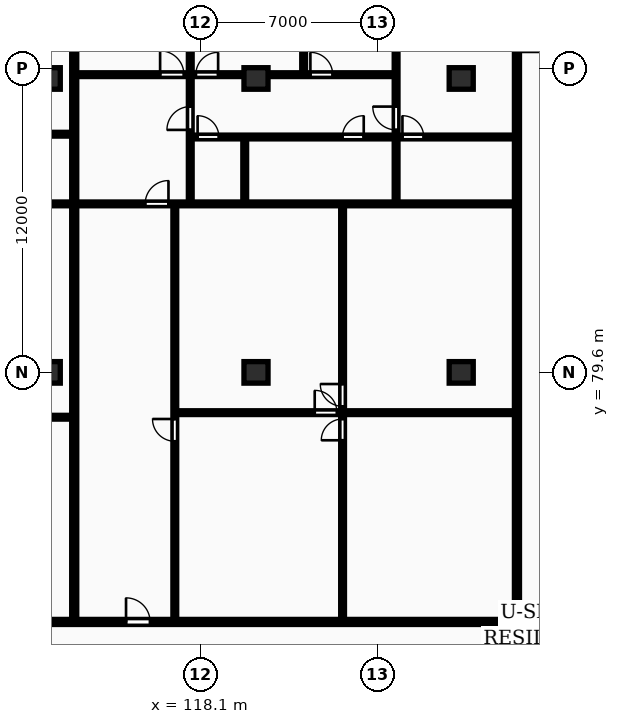
"""IFC4 building model, lengths in metres.
Left out: names, types, materials, properties, quantities, classifications, styles, units other than length and angle.
Written with IfcOpenShell. Run it as: python <this file> out.ifc"""

import sys

from ifc_helpers import new_model, si_unit, direction, frame, frame_2d, origin, origin_2d, place, context, subcontext, project, spatial, rectangle, extrude, element, fill, save


model = new_model("IFC4")
c1 = context("Model", 3, precision=1e-05, world=origin(), true_north=direction((0.0, 1.0)))
c2 = subcontext(c1, "Body", "Model", "MODEL_VIEW")
j1 = project(units=[si_unit("LENGTHUNIT", "METRE"), si_unit("PLANEANGLEUNIT", "RADIAN")], contexts=[c1])
p1 = place(None, origin())
s1 = spatial("IfcSite", under=j1, at=p1, CompositionType="ELEMENT")
p2 = place(p1, origin())
s2 = spatial("IfcBuilding", under=s1, at=p2, CompositionType="ELEMENT")
p3 = place(p2, frame((0.0, 0.0, 132.8)))
s3 = spatial("IfcBuildingStorey", under=s2, at=p3, CompositionType="ELEMENT", Elevation=132.8)
for number, where, z_axis, x_axis in (
    (1, (112.1, 79.6, 0.0), (0.0, 0.0, 1.0), (1.0, 0.0, 0.0)),
    (2, (112.1, 91.2, 0.0), (0.0, 0.0, 1.0), (1.0, 0.0, 0.0)),
    (3, (120.3, 79.6, 0.0), (0.0, 0.0, 1.0), (1.0, 0.0, 0.0)),
    (4, (120.3, 91.2, 0.0), (0.0, 0.0, 1.0), (1.0, 0.0, 0.0)),
    (5, (128.4, 79.6, 0.0), (0.0, 0.0, 1.0), (1.0, 0.0, 0.0)),
    (6, (128.4, 91.2, 0.0), (0.0, 0.0, 1.0), (1.0, 0.0, 0.0)),
):
    element("IfcColumn", number, at=place(p3, frame(where, z_axis=z_axis, x_axis=x_axis)), inside=s3, PredefinedType="COLUMN", context=c2, shape_type="SweptSolid", body=[
        extrude(rectangle(XDim=0.95, YDim=0.85, at=origin_2d()), origin(), (0.0, 0.0, 1.0), 3.25),
    ])
for number, where, z_axis, x_axis in (
    (7, (130.6, 69.83, 0.0), (0.0, 0.0, 1.0), (0.0, 1.0, 0.0)),
    (8, (113.125, 69.83, 0.0), (0.0, 0.0, 1.0), (0.0, 1.0, 0.0)),
):
    element("IfcWall", number, at=place(p3, frame(where, z_axis=z_axis, x_axis=x_axis)), inside=s3, PredefinedType="PARTITIONING", context=c2, shape_type="SweptSolid", body=[
        extrude(rectangle(XDim=26.07, YDim=0.2, at=frame_2d((13.035, 0.0))), origin(), (0.0, 0.0, 1.0), 2.97),
    ])
p4 = place(p3, frame((96.867, 77.83, 0.0), z_axis=(0.0, 0.0, 1.0), x_axis=(1.0, 0.0, 0.0)))
e9 = element("IfcWall", 9, at=p4, inside=s3, PredefinedType="PARTITIONING", context=c2, shape_type="SweptSolid", body=[
    extrude(rectangle(XDim=16.177, YDim=0.15, at=frame_2d((8.089, 0.0))), origin(), (0.0, 0.0, 1.0), 2.97),
])
p5 = place(p4, frame((3.45, 0.0, 0.0)))
e10 = element("IfcOpeningElement", 10, at=p5, cuts=e9, PredefinedType="OPENING", context=c2, shape_type="SweptSolid", body=[
    extrude(rectangle(XDim=0.88, YDim=2.06, at=frame_2d((0.44, 1.03))), frame((0.0, 0.085, 0.0), z_axis=(0.0, -1.0, 0.0), x_axis=(1.0, 0.0, 0.0)), (0.0, 0.0, 1.0), 0.17),
])
p6 = place(p3, frame((97.248, 89.0, 0.0), z_axis=(0.0, 0.0, 1.0), x_axis=(1.0, 0.0, 0.0)))
e11 = element("IfcWall", 11, at=p6, inside=s3, PredefinedType="PARTITIONING", context=c2, shape_type="SweptSolid", body=[
    extrude(rectangle(XDim=15.797, YDim=0.15, at=frame_2d((7.899, 0.0))), origin(), (0.0, 0.0, 1.0), 2.97),
])
p7 = place(p6, frame((1.191, 0.0, 0.0)))
e12 = element("IfcOpeningElement", 12, at=p7, cuts=e11, PredefinedType="OPENING", context=c2, shape_type="SweptSolid", body=[
    extrude(rectangle(XDim=0.84, YDim=2.04, at=frame_2d((0.42, 1.02))), frame((0.0, 0.085, 0.0), z_axis=(0.0, -1.0, 0.0), x_axis=(1.0, 0.0, 0.0)), (0.0, 0.0, 1.0), 0.17),
])
p8 = place(p6, frame((7.479, 0.0, 0.0)))
e13 = element("IfcOpeningElement", 13, at=p8, cuts=e11, PredefinedType="OPENING", context=c2, shape_type="SweptSolid", body=[
    extrude(rectangle(XDim=0.84, YDim=2.04, at=frame_2d((0.42, 1.02))), frame((0.0, 0.085, 0.0), z_axis=(0.0, -1.0, 0.0), x_axis=(1.0, 0.0, 0.0)), (0.0, 0.0, 1.0), 0.17),
])
p9 = place(p6, frame((11.798, 0.0, 0.0)))
e14 = element("IfcOpeningElement", 14, at=p9, cuts=e11, PredefinedType="OPENING", context=c2, shape_type="SweptSolid", body=[
    extrude(rectangle(XDim=0.84, YDim=2.04, at=frame_2d((0.42, 1.02))), frame((0.0, 0.085, 0.0), z_axis=(0.0, -1.0, 0.0), x_axis=(1.0, 0.0, 0.0)), (0.0, 0.0, 1.0), 0.17),
])
p10 = place(p3, frame((92.917, 86.25, 0.0), z_axis=(0.0, 0.0, 1.0), x_axis=(1.0, 0.0, 0.0)))
e15 = element("IfcWall", 15, at=p10, inside=s3, PredefinedType="PARTITIONING", context=c2, shape_type="SweptSolid", body=[
    extrude(rectangle(XDim=20.127, YDim=0.15, at=frame_2d((10.064, 0.0))), origin(), (0.0, 0.0, 1.0), 2.97),
])
p11 = place(p10, frame((2.72, 0.0, 0.0)))
e16 = element("IfcOpeningElement", 16, at=p11, cuts=e15, PredefinedType="OPENING", context=c2, shape_type="SweptSolid", body=[
    extrude(rectangle(XDim=0.92, YDim=2.08, at=frame_2d((0.46, 1.04))), frame((0.0, 0.085, 0.0), z_axis=(0.0, -1.0, 0.0), x_axis=(1.0, 0.0, 0.0)), (0.0, 0.0, 1.0), 0.17),
])
p12 = place(p3, frame((123.718, 69.81, 0.0), z_axis=(0.0, 0.0, 1.0), x_axis=(0.0, 1.0, 0.0)))
e17 = element("IfcWall", 17, at=p12, inside=s3, PredefinedType="PARTITIONING", context=c2, shape_type="SweptSolid", body=[
    extrude(rectangle(XDim=16.4, YDim=0.15, at=frame_2d((8.2, 0.0))), origin(), (0.0, 0.0, 1.0), 2.97),
])
p13 = place(p12, frame((7.11, 0.0, 0.0)))
e18 = element("IfcOpeningElement", 18, at=p13, cuts=e17, PredefinedType="OPENING", context=c2, shape_type="SweptSolid", body=[
    extrude(rectangle(XDim=0.84, YDim=2.04, at=frame_2d((0.42, 1.02))), frame((0.0, 0.085, 0.0), z_axis=(0.0, -1.0, 0.0), x_axis=(1.0, 0.0, 0.0)), (0.0, 0.0, 1.0), 0.17),
])
p14 = place(p12, frame((8.45, 0.0, 0.0)))
e19 = element("IfcOpeningElement", 19, at=p14, cuts=e17, PredefinedType="OPENING", context=c2, shape_type="SweptSolid", body=[
    extrude(rectangle(XDim=0.88, YDim=2.06, at=frame_2d((0.44, 1.03))), frame((0.0, 0.085, 0.0), z_axis=(0.0, -1.0, 0.0), x_axis=(1.0, 0.0, 0.0)), (0.0, 0.0, 1.0), 0.17),
])
p15 = place(p3, frame((117.155, 78.01, 0.0), z_axis=(0.0, 0.0, 1.0), x_axis=(1.0, 0.0, 0.0)))
e20 = element("IfcWall", 20, at=p15, inside=s3, PredefinedType="PARTITIONING", context=c2, shape_type="SweptSolid", body=[
    extrude(rectangle(XDim=13.365, YDim=0.15, at=frame_2d((6.683, 0.0))), origin(), (0.0, 0.0, 1.0), 2.97),
])
p16 = place(p15, frame((5.462, 0.0, 0.0)))
e21 = element("IfcOpeningElement", 21, at=p16, cuts=e20, PredefinedType="OPENING", context=c2, shape_type="SweptSolid", body=[
    extrude(rectangle(XDim=0.88, YDim=2.06, at=frame_2d((0.44, 1.03))), frame((0.0, 0.085, 0.0), z_axis=(0.0, -1.0, 0.0), x_axis=(1.0, 0.0, 0.0)), (0.0, 0.0, 1.0), 0.17),
])
p17 = place(p3, frame((117.095, 69.81, 0.0), z_axis=(0.0, 0.0, 1.0), x_axis=(0.0, 1.0, 0.0)))
e22 = element("IfcWall", 22, at=p17, inside=s3, PredefinedType="PARTITIONING", context=c2, shape_type="SweptSolid", body=[
    extrude(rectangle(XDim=16.4, YDim=0.15, at=frame_2d((8.2, 0.0))), origin(), (0.0, 0.0, 1.0), 2.97),
])
p18 = place(p17, frame((7.07, 0.0, 0.0)))
e23 = element("IfcOpeningElement", 23, at=p18, cuts=e22, PredefinedType="OPENING", context=c2, shape_type="SweptSolid", body=[
    extrude(rectangle(XDim=0.88, YDim=2.06, at=frame_2d((0.44, 1.03))), frame((0.0, 0.085, 0.0), z_axis=(0.0, -1.0, 0.0), x_axis=(1.0, 0.0, 0.0)), (0.0, 0.0, 1.0), 0.17),
])
p19 = place(p3, frame((119.855, 86.29, 0.0), z_axis=(0.0, 0.0, 1.0), x_axis=(0.0, 1.0, 0.0)))
e24 = element("IfcWall", 24, at=p19, inside=s3, PredefinedType="PARTITIONING", context=c2, shape_type="SweptSolid", body=[
    extrude(rectangle(XDim=2.58, YDim=0.15, at=frame_2d((1.29, 0.0))), origin(), (0.0, 0.0, 1.0), 2.97),
])
p20 = place(p3, frame((122.18, 91.43, 0.0), z_axis=(0.0, 0.0, 1.0), x_axis=(0.0, 1.0, 0.0)))
e25 = element("IfcWall", 25, at=p20, inside=s3, PredefinedType="PARTITIONING", context=c2, shape_type="SweptSolid", body=[
    extrude(rectangle(XDim=4.47, YDim=0.15, at=frame_2d((2.235, 0.0))), origin(), (0.0, 0.0, 1.0), 2.97),
])
p21 = place(p3, frame((117.705, 86.29, 0.0), z_axis=(0.0, 0.0, 1.0), x_axis=(0.0, 1.0, 0.0)))
e26 = element("IfcWall", 26, at=p21, inside=s3, PredefinedType="PARTITIONING", context=c2, shape_type="SweptSolid", body=[
    extrude(rectangle(XDim=9.61, YDim=0.15, at=frame_2d((4.805, 0.0))), origin(), (0.0, 0.0, 1.0), 2.97),
])
p22 = place(p21, frame((2.88, 0.0, 0.0)))
e27 = element("IfcOpeningElement", 27, at=p22, cuts=e26, PredefinedType="OPENING", context=c2, shape_type="SweptSolid", body=[
    extrude(rectangle(XDim=0.92, YDim=2.08, at=frame_2d((0.46, 1.04))), frame((0.0, 0.085, 0.0), z_axis=(0.0, -1.0, 0.0), x_axis=(1.0, 0.0, 0.0)), (0.0, 0.0, 1.0), 0.17),
])
p23 = place(p3, frame((125.83, 86.29, 0.0), z_axis=(0.0, 0.0, 1.0), x_axis=(0.0, 1.0, 0.0)))
e28 = element("IfcWall", 28, at=p23, inside=s3, PredefinedType="PARTITIONING", context=c2, shape_type="SweptSolid", body=[
    extrude(rectangle(XDim=2.58, YDim=0.15, at=frame_2d((1.29, 0.0))), origin(), (0.0, 0.0, 1.0), 2.97),
])
p24 = place(p3, frame((125.83, 88.91, 0.0), z_axis=(0.0, 0.0, 1.0), x_axis=(0.0, 1.0, 0.0)))
e29 = element("IfcWall", 29, at=p24, inside=s3, PredefinedType="PARTITIONING", context=c2, shape_type="SweptSolid", body=[
    extrude(rectangle(XDim=6.99, YDim=0.15, at=frame_2d((3.495, 0.0))), origin(), (0.0, 0.0, 1.0), 2.97),
])
p25 = place(p24, frame((0.26, 0.0, 0.0)))
e30 = element("IfcOpeningElement", 30, at=p25, cuts=e29, PredefinedType="OPENING", context=c2, shape_type="SweptSolid", body=[
    extrude(rectangle(XDim=0.92, YDim=2.08, at=frame_2d((0.46, 1.04))), frame((0.0, 0.085, 0.0), z_axis=(0.0, -1.0, 0.0), x_axis=(1.0, 0.0, 0.0)), (0.0, 0.0, 1.0), 0.17),
])
p26 = place(p3, frame((117.745, 88.89, 0.0), z_axis=(0.0, 0.0, 1.0), x_axis=(1.0, 0.0, 0.0)))
e31 = element("IfcWall", 31, at=p26, inside=s3, PredefinedType="PARTITIONING", context=c2, shape_type="SweptSolid", body=[
    extrude(rectangle(XDim=12.775, YDim=0.15, at=frame_2d((6.387, 0.0))), origin(), (0.0, 0.0, 1.0), 2.97),
])
p27 = place(p26, frame((0.25, 0.0, 0.0)))
e32 = element("IfcOpeningElement", 32, at=p27, cuts=e31, PredefinedType="OPENING", context=c2, shape_type="SweptSolid", body=[
    extrude(rectangle(XDim=0.84, YDim=2.04, at=frame_2d((0.42, 1.02))), frame((0.0, 0.085, 0.0), z_axis=(0.0, -1.0, 0.0), x_axis=(1.0, 0.0, 0.0)), (0.0, 0.0, 1.0), 0.17),
])
p28 = place(p26, frame((5.968, 0.0, 0.0)))
e33 = element("IfcOpeningElement", 33, at=p28, cuts=e31, PredefinedType="OPENING", context=c2, shape_type="SweptSolid", body=[
    extrude(rectangle(XDim=0.84, YDim=2.04, at=frame_2d((0.42, 1.02))), frame((0.0, 0.085, 0.0), z_axis=(0.0, -1.0, 0.0), x_axis=(1.0, 0.0, 0.0)), (0.0, 0.0, 1.0), 0.17),
])
p29 = place(p26, frame((8.335, 0.0, 0.0)))
e34 = element("IfcOpeningElement", 34, at=p29, cuts=e31, PredefinedType="OPENING", context=c2, shape_type="SweptSolid", body=[
    extrude(rectangle(XDim=0.84, YDim=2.04, at=frame_2d((0.42, 1.02))), frame((0.0, 0.085, 0.0), z_axis=(0.0, -1.0, 0.0), x_axis=(1.0, 0.0, 0.0)), (0.0, 0.0, 1.0), 0.17),
])
p30 = place(p3, frame((113.205, 86.25, 0.0), z_axis=(0.0, 0.0, 1.0), x_axis=(1.0, 0.0, 0.0)))
e35 = element("IfcWall", 35, at=p30, inside=s3, PredefinedType="PARTITIONING", context=c2, shape_type="SweptSolid", body=[
    extrude(rectangle(XDim=17.315, YDim=0.15, at=frame_2d((8.657, 0.0))), origin(), (0.0, 0.0, 1.0), 2.97),
])
p31 = place(p30, frame((2.72, 0.0, 0.0)))
e36 = element("IfcOpeningElement", 36, at=p31, cuts=e35, PredefinedType="OPENING", context=c2, shape_type="SweptSolid", body=[
    extrude(rectangle(XDim=0.92, YDim=2.08, at=frame_2d((0.46, 1.04))), frame((0.0, 0.085, 0.0), z_axis=(0.0, -1.0, 0.0), x_axis=(1.0, 0.0, 0.0)), (0.0, 0.0, 1.0), 0.17),
])
p32 = place(p3, frame((113.205, 91.35, 0.0), z_axis=(0.0, 0.0, 1.0), x_axis=(1.0, 0.0, 0.0)))
e37 = element("IfcWall", 37, at=p32, inside=s3, PredefinedType="PARTITIONING", context=c2, shape_type="SweptSolid", body=[
    extrude(rectangle(XDim=12.625, YDim=0.15, at=frame_2d((6.312, 0.0))), origin(), (0.0, 0.0, 1.0), 2.663),
])
p33 = place(p32, frame((3.31, 0.0, 0.0)))
e38 = element("IfcOpeningElement", 38, at=p33, cuts=e37, PredefinedType="OPENING", context=c2, shape_type="SweptSolid", body=[
    extrude(rectangle(XDim=0.94, YDim=2.1, at=frame_2d((0.47, 1.05))), frame((0.0, 0.085, 0.0), z_axis=(0.0, -1.0, 0.0), x_axis=(1.0, 0.0, 0.0)), (0.0, 0.0, 1.0), 0.17),
])
p34 = place(p32, frame((4.72, 0.0, 0.0)))
e39 = element("IfcOpeningElement", 39, at=p34, cuts=e37, PredefinedType="OPENING", context=c2, shape_type="SweptSolid", body=[
    extrude(rectangle(XDim=0.88, YDim=2.06, at=frame_2d((0.44, 1.03))), frame((0.0, 0.085, 0.0), z_axis=(0.0, -1.0, 0.0), x_axis=(1.0, 0.0, 0.0)), (0.0, 0.0, 1.0), 0.17),
])
p35 = place(p32, frame((9.242, 0.0, 0.0)))
e40 = element("IfcOpeningElement", 40, at=p35, cuts=e37, PredefinedType="OPENING", context=c2, shape_type="SweptSolid", body=[
    extrude(rectangle(XDim=0.88, YDim=2.06, at=frame_2d((0.44, 1.03))), frame((0.0, 0.085, 0.0), z_axis=(0.0, -1.0, 0.0), x_axis=(1.0, 0.0, 0.0)), (0.0, 0.0, 1.0), 0.17),
])
p36 = place(p3, frame((57.6, 69.75, 0.0), z_axis=(0.0, 0.0, 1.0), x_axis=(1.0, 0.0, 0.0)))
e41 = element("IfcWall", 41, at=p36, inside=s3, PredefinedType="PARTITIONING", context=c2, shape_type="SweptSolid", body=[
    extrude(rectangle(XDim=73.0, YDim=0.2, at=frame_2d((36.5, 0.0))), origin(), (0.0, 0.0, 1.0), 2.97),
])
p37 = place(p36, frame((6.629, 0.0, 0.0)))
e42 = element("IfcOpeningElement", 42, at=p37, cuts=e41, PredefinedType="OPENING", context=c2, shape_type="SweptSolid", body=[
    extrude(rectangle(XDim=1.22, YDim=2.18, at=frame_2d((0.61, 1.09))), frame((0.0, 0.11, 0.0), z_axis=(0.0, -1.0, 0.0), x_axis=(1.0, 0.0, 0.0)), (0.0, 0.0, 1.0), 0.22),
])
p38 = place(p36, frame((24.022, 0.0, 0.0)))
e43 = element("IfcOpeningElement", 43, at=p38, cuts=e41, PredefinedType="OPENING", context=c2, shape_type="SweptSolid", body=[
    extrude(rectangle(XDim=1.22, YDim=2.18, at=frame_2d((0.61, 1.09))), frame((0.0, 0.11, 0.0), z_axis=(0.0, -1.0, 0.0), x_axis=(1.0, 0.0, 0.0)), (0.0, 0.0, 1.0), 0.22),
])
p39 = place(p36, frame((37.768, 0.0, 0.0)))
e44 = element("IfcOpeningElement", 44, at=p39, cuts=e41, PredefinedType="OPENING", context=c2, shape_type="SweptSolid", body=[
    extrude(rectangle(XDim=0.95, YDim=2.15, at=frame_2d((0.475, 1.075))), frame((0.0, 0.11, 0.0), z_axis=(0.0, -1.0, 0.0), x_axis=(1.0, 0.0, 0.0)), (0.0, 0.0, 1.0), 0.22),
])
p40 = place(p36, frame((57.57, 0.0, 0.0)))
e45 = element("IfcOpeningElement", 45, at=p40, cuts=e41, PredefinedType="OPENING", context=c2, shape_type="SweptSolid", body=[
    extrude(rectangle(XDim=0.95, YDim=2.15, at=frame_2d((0.475, 1.075))), frame((0.0, 0.11, 0.0), z_axis=(0.0, -1.0, 0.0), x_axis=(1.0, 0.0, 0.0)), (0.0, 0.0, 1.0), 0.22),
])
p41 = place(p13, origin())
e46 = element("IfcDoor", 46, at=p41, inside=s3, OperationType="SINGLE_SWING_LEFT", PredefinedType="DOOR", context=c2, shape_type="SweptSolid", body=[
    extrude(rectangle(XDim=0.84, YDim=2.04, at=frame_2d((0.42, 1.02))), frame((0.0, 0.025, 0.0), z_axis=(0.0, -1.0, 0.0), x_axis=(1.0, 0.0, 0.0)), (0.0, 0.0, 1.0), 0.05),
])
fill(e18, e46)
p42 = place(p14, origin())
e47 = element("IfcDoor", 47, at=p42, inside=s3, OperationType="SINGLE_SWING_RIGHT", PredefinedType="DOOR", context=c2, shape_type="SweptSolid", body=[
    extrude(rectangle(XDim=0.88, YDim=2.06, at=frame_2d((0.44, 1.03))), frame((0.0, 0.025, 0.0), z_axis=(0.0, -1.0, 0.0), x_axis=(1.0, 0.0, 0.0)), (0.0, 0.0, 1.0), 0.05),
])
fill(e19, e47)
p43 = place(p16, origin())
e48 = element("IfcDoor", 48, at=p43, inside=s3, OperationType="SINGLE_SWING_LEFT", PredefinedType="DOOR", context=c2, shape_type="SweptSolid", body=[
    extrude(rectangle(XDim=0.88, YDim=2.06, at=frame_2d((0.44, 1.03))), frame((0.0, 0.025, 0.0), z_axis=(0.0, -1.0, 0.0), x_axis=(1.0, 0.0, 0.0)), (0.0, 0.0, 1.0), 0.05),
])
fill(e21, e48)
p44 = place(p18, origin())
e49 = element("IfcDoor", 49, at=p44, inside=s3, OperationType="SINGLE_SWING_RIGHT", PredefinedType="DOOR", context=c2, shape_type="SweptSolid", body=[
    extrude(rectangle(XDim=0.88, YDim=2.06, at=frame_2d((0.44, 1.03))), frame((0.0, 0.025, 0.0), z_axis=(0.0, -1.0, 0.0), x_axis=(1.0, 0.0, 0.0)), (0.0, 0.0, 1.0), 0.05),
])
fill(e23, e49)
p45 = place(p22, origin())
e50 = element("IfcDoor", 50, at=p45, inside=s3, OperationType="SINGLE_SWING_LEFT", PredefinedType="DOOR", context=c2, shape_type="SweptSolid", body=[
    extrude(rectangle(XDim=0.92, YDim=2.08, at=frame_2d((0.46, 1.04))), frame((0.0, 0.025, 0.0), z_axis=(0.0, -1.0, 0.0), x_axis=(1.0, 0.0, 0.0)), (0.0, 0.0, 1.0), 0.05),
])
fill(e27, e50)
p46 = place(p25, origin())
e51 = element("IfcDoor", 51, at=p46, inside=s3, OperationType="SINGLE_SWING_RIGHT", PredefinedType="DOOR", context=c2, shape_type="SweptSolid", body=[
    extrude(rectangle(XDim=0.92, YDim=2.08, at=frame_2d((0.46, 1.04))), frame((0.0, 0.025, 0.0), z_axis=(0.0, -1.0, 0.0), x_axis=(1.0, 0.0, 0.0)), (0.0, 0.0, 1.0), 0.05),
])
fill(e30, e51)
p47 = place(p27, origin())
e52 = element("IfcDoor", 52, at=p47, inside=s3, OperationType="SINGLE_SWING_LEFT", PredefinedType="DOOR", context=c2, shape_type="SweptSolid", body=[
    extrude(rectangle(XDim=0.84, YDim=2.04, at=frame_2d((0.42, 1.02))), frame((0.0, 0.025, 0.0), z_axis=(0.0, -1.0, 0.0), x_axis=(1.0, 0.0, 0.0)), (0.0, 0.0, 1.0), 0.05),
])
fill(e32, e52)
p48 = place(p28, origin())
e53 = element("IfcDoor", 53, at=p48, inside=s3, OperationType="SINGLE_SWING_RIGHT", PredefinedType="DOOR", context=c2, shape_type="SweptSolid", body=[
    extrude(rectangle(XDim=0.84, YDim=2.04, at=frame_2d((0.42, 1.02))), frame((0.0, 0.025, 0.0), z_axis=(0.0, -1.0, 0.0), x_axis=(1.0, 0.0, 0.0)), (0.0, 0.0, 1.0), 0.05),
])
fill(e33, e53)
p49 = place(p29, origin())
e54 = element("IfcDoor", 54, at=p49, inside=s3, OperationType="SINGLE_SWING_LEFT", PredefinedType="DOOR", context=c2, shape_type="SweptSolid", body=[
    extrude(rectangle(XDim=0.84, YDim=2.04, at=frame_2d((0.42, 1.02))), frame((0.0, 0.025, 0.0), z_axis=(0.0, -1.0, 0.0), x_axis=(1.0, 0.0, 0.0)), (0.0, 0.0, 1.0), 0.05),
])
fill(e34, e54)
p50 = place(p31, origin())
e55 = element("IfcDoor", 55, at=p50, inside=s3, OperationType="SINGLE_SWING_RIGHT", PredefinedType="DOOR", context=c2, shape_type="SweptSolid", body=[
    extrude(rectangle(XDim=0.92, YDim=2.08, at=frame_2d((0.46, 1.04))), frame((0.0, 0.025, 0.0), z_axis=(0.0, -1.0, 0.0), x_axis=(1.0, 0.0, 0.0)), (0.0, 0.0, 1.0), 0.05),
])
fill(e36, e55)
p51 = place(p33, origin())
e56 = element("IfcDoor", 56, at=p51, inside=s3, OperationType="SINGLE_SWING_LEFT", PredefinedType="DOOR", context=c2, shape_type="SweptSolid", body=[
    extrude(rectangle(XDim=0.94, YDim=2.1, at=frame_2d((0.47, 1.05))), frame((0.0, 0.025, 0.0), z_axis=(0.0, -1.0, 0.0), x_axis=(1.0, 0.0, 0.0)), (0.0, 0.0, 1.0), 0.05),
])
fill(e38, e56)
p52 = place(p34, origin())
e57 = element("IfcDoor", 57, at=p52, inside=s3, OperationType="SINGLE_SWING_RIGHT", PredefinedType="DOOR", context=c2, shape_type="SweptSolid", body=[
    extrude(rectangle(XDim=0.88, YDim=2.06, at=frame_2d((0.44, 1.03))), frame((0.0, 0.025, 0.0), z_axis=(0.0, -1.0, 0.0), x_axis=(1.0, 0.0, 0.0)), (0.0, 0.0, 1.0), 0.05),
])
fill(e39, e57)
p53 = place(p35, origin())
e58 = element("IfcDoor", 58, at=p53, inside=s3, OperationType="SINGLE_SWING_LEFT", PredefinedType="DOOR", context=c2, shape_type="SweptSolid", body=[
    extrude(rectangle(XDim=0.88, YDim=2.06, at=frame_2d((0.44, 1.03))), frame((0.0, 0.025, 0.0), z_axis=(0.0, -1.0, 0.0), x_axis=(1.0, 0.0, 0.0)), (0.0, 0.0, 1.0), 0.05),
])
fill(e40, e58)
p54 = place(p40, origin())
e59 = element("IfcDoor", 59, at=p54, inside=s3, OperationType="SINGLE_SWING_LEFT", PredefinedType="DOOR", context=c2, shape_type="SweptSolid", body=[
    extrude(rectangle(XDim=0.95, YDim=2.15, at=frame_2d((0.475, 1.075))), frame((0.0, 0.025, 0.0), z_axis=(0.0, -1.0, 0.0), x_axis=(1.0, 0.0, 0.0)), (0.0, 0.0, 1.0), 0.05),
])
fill(e45, e59)
save(model, sys.argv[1])
